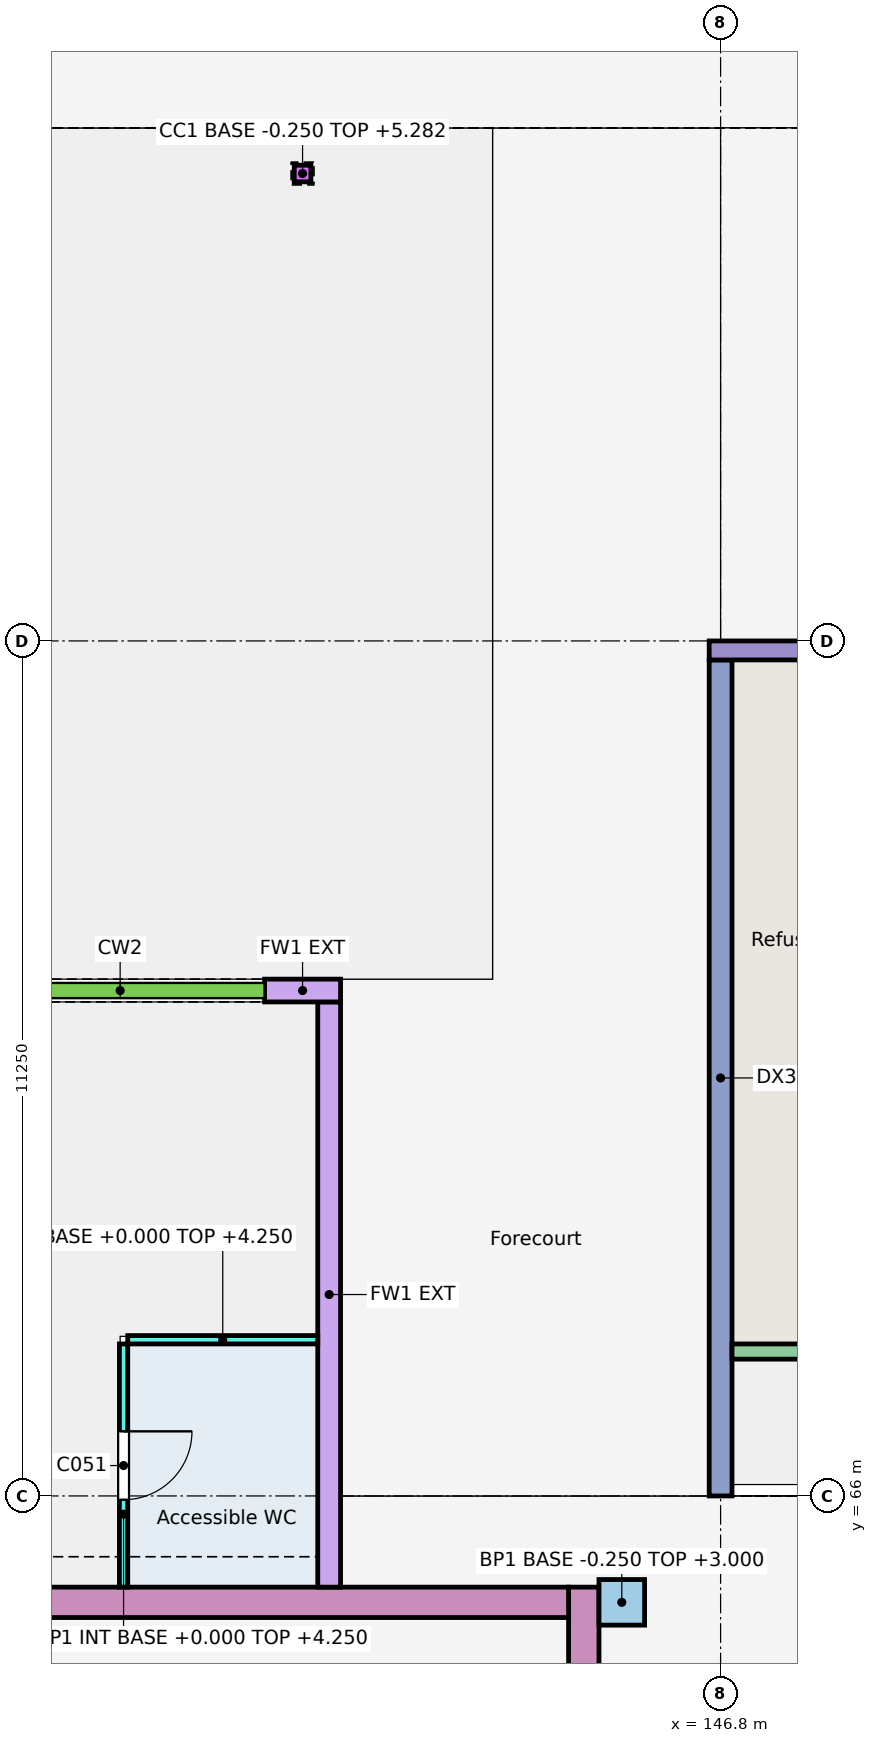
"""IFC4 building model, lengths in metres.
Left out: names, types, materials, properties, quantities, classifications, styles, units other than length and angle.
Written with IfcOpenShell. Run it as: python <this file> out.ifc"""

import sys

from ifc_helpers import new_model, si_unit, direction, frame, frame_2d, origin, origin_2d, place, context, subcontext, project, spatial, rectangle, hollow_circle, extrude, element, fill, save


model = new_model("IFC4")
c1 = context("Model", 3, precision=1e-05, world=origin(), true_north=direction((0.0, 1.0)))
c2 = subcontext(c1, "Body", "Model", "MODEL_VIEW")
j1 = project(units=[si_unit("LENGTHUNIT", "METRE"), si_unit("PLANEANGLEUNIT", "RADIAN")], contexts=[c1])
p1 = place(None, origin())
s1 = spatial("IfcSite", under=j1, at=p1, CompositionType="ELEMENT")
p2 = place(p1, origin())
s2 = spatial("IfcBuilding", under=s1, at=p2, CompositionType="ELEMENT")
p3 = place(p2, origin())
s3 = spatial("IfcBuildingStorey", under=s2, at=p3, CompositionType="ELEMENT", Elevation=0.0)
p4 = place(p3, frame((146.8, 66.0, -0.25), z_axis=(0.0, 0.0, 1.0), x_axis=(0.0, 1.0, 0.0)))
e1 = element("IfcWall", 1, at=p4, inside=s3, PredefinedType="SHEAR", context=c2, shape_type="SweptSolid", body=[
    extrude(rectangle(XDim=11.0, YDim=0.3, at=frame_2d((5.5, 0.0))), origin(), (0.0, 0.0, 1.0), 3.25),
])
p5 = place(p3, frame((146.65, 77.125, -0.25), z_axis=(0.0, 0.0, 1.0), x_axis=(1.0, 0.0, 0.0)))
e2 = element("IfcWall", 2, at=p5, inside=s3, PredefinedType="SOLIDWALL", context=c2, shape_type="SweptSolid", body=[
    extrude(rectangle(XDim=3.75, YDim=0.25, at=frame_2d((1.875, 0.0))), origin(), (0.0, 0.0, 1.0), 3.25),
])
p6 = place(p5, frame((1.462, 0.0, 0.25)))
e3 = element("IfcOpeningElement", 3, at=p6, cuts=e2, PredefinedType="OPENING", context=c2, shape_type="SweptSolid", body=[
    extrude(rectangle(XDim=1.0, YDim=2.1, at=frame_2d((0.5, 1.05))), frame((0.0, 0.135, 0.0), z_axis=(0.0, -1.0, 0.0), x_axis=(1.0, 0.0, 0.0)), (0.0, 0.0, 1.0), 0.27),
])
p7 = place(p3, frame((146.95, 67.9, -0.25), z_axis=(0.0, 0.0, 1.0), x_axis=(1.0, 0.0, 0.0)))
e4 = element("IfcWall", 4, at=p7, inside=s3, PredefinedType="SOLIDWALL", context=c2, shape_type="SweptSolid", body=[
    extrude(rectangle(XDim=3.45, YDim=0.2, at=frame_2d((1.725, 0.0))), origin(), (0.0, 0.0, 1.0), 3.25),
])
p8 = place(p7, frame((1.163, 0.0, 0.25)))
e5 = element("IfcOpeningElement", 5, at=p8, cuts=e4, PredefinedType="OPENING", context=c2, shape_type="SweptSolid", body=[
    extrude(rectangle(XDim=1.0, YDim=2.1, at=frame_2d((0.5, 1.05))), frame((0.0, 0.11, 0.0), z_axis=(0.0, -1.0, 0.0), x_axis=(1.0, 0.0, 0.0)), (0.0, 0.0, 1.0), 0.22),
])
p9 = place(p3, frame((145.0, 32.0, -0.25), z_axis=(0.0, 0.0, 1.0), x_axis=(0.0, 1.0, 0.0)))
e6 = element("IfcWall", 6, at=p9, inside=s3, PredefinedType="SOLIDWALL", context=c2, shape_type="SweptSolid", body=[
    extrude(rectangle(XDim=32.8, YDim=0.4, at=frame_2d((16.4, 0.0))), origin(), (0.0, 0.0, 1.0), 3.25),
])
p10 = place(p9, frame((2.2, 0.0, 0.25)))
e7 = element("IfcOpeningElement", 7, at=p10, cuts=e6, PredefinedType="OPENING", context=c2, shape_type="SweptSolid", body=[
    extrude(rectangle(XDim=1.8, YDim=2.1, at=frame_2d((0.9, 1.05))), frame((0.0, 0.21, 0.0), z_axis=(0.0, -1.0, 0.0), x_axis=(1.0, 0.0, 0.0)), (0.0, 0.0, 1.0), 0.42),
])
p11 = place(p9, frame((29.0, 0.0, 0.25)))
e8 = element("IfcOpeningElement", 8, at=p11, cuts=e6, PredefinedType="OPENING", context=c2, shape_type="SweptSolid", body=[
    extrude(rectangle(XDim=1.8, YDim=2.1, at=frame_2d((0.9, 1.05))), frame((0.0, 0.21, 0.0), z_axis=(0.0, -1.0, 0.0), x_axis=(1.0, 0.0, 0.0)), (0.0, 0.0, 1.0), 0.42),
])
p12 = place(p3, frame((114.8, 64.6, -0.25), z_axis=(0.0, 0.0, 1.0), x_axis=(1.0, 0.0, 0.0)))
e9 = element("IfcWall", 9, at=p12, inside=s3, PredefinedType="SOLIDWALL", context=c2, shape_type="SweptSolid", body=[
    extrude(rectangle(XDim=30.0, YDim=0.4, at=frame_2d((15.0, 0.0))), origin(), (0.0, 0.0, 1.0), 3.25),
])
p13 = place(p12, frame((8.1, 0.0, 0.25)))
e10 = element("IfcOpeningElement", 10, at=p13, cuts=e9, PredefinedType="OPENING", context=c2, shape_type="SweptSolid", body=[
    extrude(rectangle(XDim=1.8, YDim=2.1, at=frame_2d((0.9, 1.05))), frame((0.0, 0.21, 0.0), z_axis=(0.0, -1.0, 0.0), x_axis=(1.0, 0.0, 0.0)), (0.0, 0.0, 1.0), 0.42),
])
p14 = place(p12, frame((14.1, 0.0, 0.25)))
e11 = element("IfcOpeningElement", 11, at=p14, cuts=e9, PredefinedType="OPENING", context=c2, shape_type="SweptSolid", body=[
    extrude(rectangle(XDim=1.8, YDim=2.1, at=frame_2d((0.9, 1.05))), frame((0.0, 0.21, 0.0), z_axis=(0.0, -1.0, 0.0), x_axis=(1.0, 0.0, 0.0)), (0.0, 0.0, 1.0), 0.42),
])
p15 = place(p12, frame((20.1, 0.0, 0.25)))
e12 = element("IfcOpeningElement", 12, at=p15, cuts=e9, PredefinedType="OPENING", context=c2, shape_type="SweptSolid", body=[
    extrude(rectangle(XDim=1.8, YDim=2.1, at=frame_2d((0.9, 1.05))), frame((0.0, 0.21, 0.0), z_axis=(0.0, -1.0, 0.0), x_axis=(1.0, 0.0, 0.0)), (0.0, 0.0, 1.0), 0.42),
])
p16 = place(p3, frame((145.5, 64.6, -0.25), z_axis=(0.0, 0.0, 1.0), x_axis=(1.0, 0.0, 0.0)))
e13 = element("IfcColumn", 13, at=p16, inside=s3, PredefinedType="COLUMN", context=c2, shape_type="SweptSolid", body=[
    extrude(rectangle(XDim=0.6, YDim=0.6, at=origin_2d()), origin(), (0.0, 0.0, 1.0), 3.25),
])
p17 = place(p3, frame((141.65, 64.8, -0.25), z_axis=(0.0, 0.0, 1.0), x_axis=(0.0, 1.0, 0.0)))
e14 = element("IfcWall", 14, at=p17, inside=s3, PredefinedType="SOLIDWALL", context=c2, shape_type="SweptSolid", body=[
    extrude(rectangle(XDim=7.7, YDim=0.3, at=frame_2d((3.85, 0.0))), origin(), (0.0, 0.0, 1.0), 4.5),
])
p18 = place(p3, frame((140.8, 72.65, -0.25), z_axis=(0.0, 0.0, 1.0), x_axis=(1.0, 0.0, 0.0)))
e15 = element("IfcWall", 15, at=p18, inside=s3, PredefinedType="SOLIDWALL", context=c2, shape_type="SweptSolid", body=[
    extrude(rectangle(XDim=1.0, YDim=0.3, at=frame_2d((0.5, 0.0))), origin(), (0.0, 0.0, 1.0), 4.5),
])
p19 = place(p3, frame((141.3, 83.4, -0.25), z_axis=(0.0, 0.0, 1.0), x_axis=(1.0, 0.0, 0.0)))
e16 = element("IfcColumn", 16, at=p19, inside=s3, PredefinedType="COLUMN", context=c2, shape_type="SweptSolid", body=[
    extrude(hollow_circle(Radius=0.11, WallThickness=0.008, at=origin_2d()), origin(), (0.0, 0.0, 1.0), 5.532),
])
p20 = place(p3, frame((138.945, 64.8, 0.0), z_axis=(0.0, 0.0, 1.0), x_axis=(0.0, 1.0, 0.0)))
e17 = element("IfcWall", 17, at=p20, inside=s3, PredefinedType="PARTITIONING", context=c2, shape_type="SweptSolid", body=[
    extrude(rectangle(XDim=3.2, YDim=0.11, at=frame_2d((1.6, 0.0))), origin(), (0.0, 0.0, 1.0), 4.25),
])
p21 = place(p20, frame((1.15, 0.0, 0.0)))
e18 = element("IfcOpeningElement", 18, at=p21, cuts=e17, PredefinedType="OPENING", context=c2, shape_type="SweptSolid", body=[
    extrude(rectangle(XDim=0.9, YDim=2.1, at=frame_2d((0.45, 1.05))), frame((0.0, 0.065, 0.0), z_axis=(0.0, -1.0, 0.0), x_axis=(1.0, 0.0, 0.0)), (0.0, 0.0, 1.0), 0.13),
])
p22 = place(p3, frame((139.0, 68.055, 0.0), z_axis=(0.0, 0.0, 1.0), x_axis=(1.0, 0.0, 0.0)))
e19 = element("IfcWall", 19, at=p22, inside=s3, PredefinedType="PARTITIONING", context=c2, shape_type="SweptSolid", body=[
    extrude(rectangle(XDim=2.5, YDim=0.11, at=frame_2d((1.25, 0.0))), origin(), (0.0, 0.0, 1.0), 4.25),
])
p23 = place(p21, origin())
e20 = element("IfcDoor", 20, at=p23, inside=s3, OperationType="SINGLE_SWING_RIGHT", PredefinedType="DOOR", context=c2, shape_type="SweptSolid", body=[
    extrude(rectangle(XDim=0.9, YDim=2.1, at=frame_2d((0.45, 1.05))), frame((0.0, 0.025, 0.0), z_axis=(0.0, -1.0, 0.0), x_axis=(1.0, 0.0, 0.0)), (0.0, 0.0, 1.0), 0.05),
])
fill(e18, e20)
save(model, sys.argv[1])
